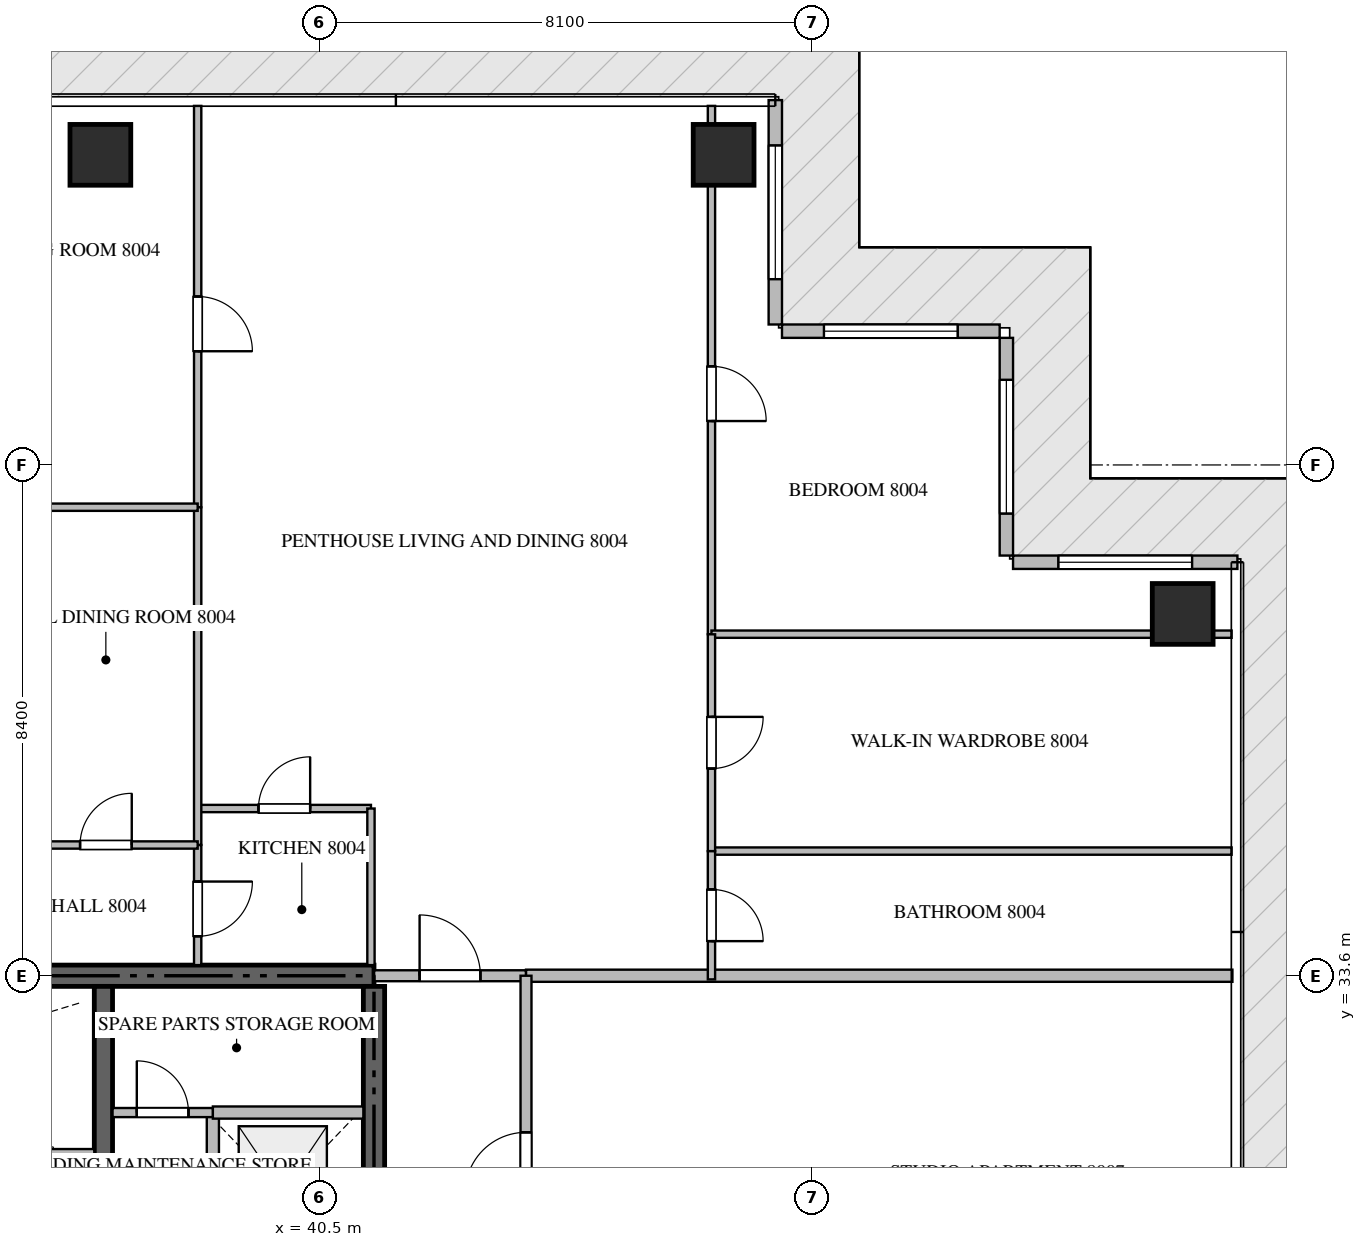
"""IFC4 building model, lengths in metres.
Left out: names, types, materials, properties, quantities, classifications, styles, units other than length and angle.
Written with IfcOpenShell. Run it as: python <this file> out.ifc"""

import sys

from ifc_helpers import new_model, si_unit, direction, frame, frame_2d, origin, origin_2d, place, context, subcontext, project, spatial, rectangle, extrude, source, transform, mapped, element, fill, save


model = new_model("IFC4")
c1 = context("Model", 3, precision=1e-05, world=origin(), true_north=direction((0.0, 1.0)))
c2 = subcontext(c1, "Body", "Model", "MODEL_VIEW")
j1 = project(units=[si_unit("LENGTHUNIT", "METRE"), si_unit("PLANEANGLEUNIT", "RADIAN")], contexts=[c1])
p1 = place(None, origin())
s1 = spatial("IfcSite", under=j1, at=p1, CompositionType="ELEMENT")
p2 = place(p1, origin())
s2 = spatial("IfcBuilding", under=s1, at=p2, CompositionType="ELEMENT")
p3 = place(p2, frame((0.0, 0.0, 321.8)))
s3 = spatial("IfcBuildingStorey", under=s2, at=p3, CompositionType="ELEMENT", Elevation=321.8)
p4 = place(p3, frame((41.4, 33.6, -0.26), z_axis=(0.0, 0.0, 1.0), x_axis=(-1.0, 0.0, 0.0)))
e1 = element("IfcWall", 1, at=p4, inside=s3, PredefinedType="SHEAR", context=c2, shape_type="SweptSolid", body=[
    extrude(rectangle(XDim=18.0, YDim=0.35, at=frame_2d((9.0, 0.0))), origin(), (0.0, 0.0, 1.0), 4.048),
])
p5 = place(p3, frame((41.4, 27.75, -0.26), z_axis=(0.0, 0.0, 1.0), x_axis=(0.0, 1.0, 0.0)))
e2 = element("IfcWall", 2, at=p5, inside=s3, PredefinedType="SHEAR", context=c2, shape_type="SweptSolid", body=[
    extrude(rectangle(XDim=5.675, YDim=0.35, at=frame_2d((2.837, 0.0))), origin(), (0.0, 0.0, 1.0), 4.048),
])
p6 = place(p3, frame((36.95, 27.05, -0.26), z_axis=(0.0, 0.0, 1.0), x_axis=(0.0, 1.0, 0.0)))
e3 = element("IfcWall", 3, at=p6, inside=s3, PredefinedType="SHEAR", context=c2, shape_type="SweptSolid", body=[
    extrude(rectangle(XDim=6.375, YDim=0.3, at=frame_2d((3.188, 0.0))), origin(), (0.0, 0.0, 1.0), 4.048),
])
m1 = source(origin(), c2, "Body", "SweptSolid", [
    extrude(rectangle(XDim=1.0, YDim=1.0, at=origin_2d()), origin(), (0.0, 0.0, 1.0), 4.05),
])
for number, where, z_axis, x_axis in (
    (4, (36.9, 47.1, -0.26), (0.0, 0.0, 1.0), (1.0, 0.0, 0.0)),
    (5, (47.15, 47.1, -0.26), (0.0, 0.0, 1.0), (1.0, 0.0, 0.0)),
    (6, (54.7, 39.55, -0.26), (0.0, 0.0, 1.0), (1.0, 0.0, 0.0)),
):
    element("IfcColumn", number, at=place(p3, frame(where, z_axis=z_axis, x_axis=x_axis)), inside=s3, PredefinedType="COLUMN", context=c2, shape_type="MappedRepresentation", body=[
        mapped(m1, transform((0.0, 0.0, 0.0), scale=1.0)),
    ])
p7 = place(p3, frame((55.6, 40.4, 0.0), z_axis=(0.0, 0.0, 1.0), x_axis=(-1.0, 0.0, 0.0)))
e7 = element("IfcWall", 7, at=p7, inside=s3, PredefinedType="ELEMENTEDWALL", context=c2, shape_type="SweptSolid", body=[
    extrude(rectangle(XDim=3.69, YDim=0.22, at=frame_2d((1.845, 0.0))), origin(), (0.0, 0.0, 1.0), 3.775),
])
p8 = place(p7, frame((0.745, 0.0, 0.65)))
e8 = element("IfcOpeningElement", 8, at=p8, cuts=e7, PredefinedType="OPENING", context=c2, shape_type="SweptSolid", body=[
    extrude(rectangle(XDim=2.2, YDim=2.4, at=frame_2d((1.1, 1.2))), frame((0.0, 0.12, 0.0), z_axis=(0.0, -1.0, 0.0), x_axis=(1.0, 0.0, 0.0)), (0.0, 0.0, 1.0), 0.24),
])
p9 = place(p3, frame((51.8, 40.51, 0.0), z_axis=(0.0, 0.0, 1.0), x_axis=(0.0, 1.0, 0.0)))
e9 = element("IfcWall", 9, at=p9, inside=s3, PredefinedType="ELEMENTEDWALL", context=c2, shape_type="SweptSolid", body=[
    extrude(rectangle(XDim=3.58, YDim=0.22, at=frame_2d((1.79, 0.0))), origin(), (0.0, 0.0, 1.0), 3.775),
])
p10 = place(p9, frame((0.69, 0.0, 0.65)))
e10 = element("IfcOpeningElement", 10, at=p10, cuts=e9, PredefinedType="OPENING", context=c2, shape_type="SweptSolid", body=[
    extrude(rectangle(XDim=2.2, YDim=2.4, at=frame_2d((1.1, 1.2))), frame((0.0, 0.12, 0.0), z_axis=(0.0, -1.0, 0.0), x_axis=(1.0, 0.0, 0.0)), (0.0, 0.0, 1.0), 0.24),
])
p11 = place(p3, frame((51.69, 44.2, 0.0), z_axis=(0.0, 0.0, 1.0), x_axis=(-1.0, 0.0, 0.0)))
e11 = element("IfcWall", 11, at=p11, inside=s3, PredefinedType="ELEMENTEDWALL", context=c2, shape_type="SweptSolid", body=[
    extrude(rectangle(XDim=3.58, YDim=0.22, at=frame_2d((1.79, 0.0))), origin(), (0.0, 0.0, 1.0), 3.775),
])
p12 = place(p11, frame((0.69, 0.0, 0.65)))
e12 = element("IfcOpeningElement", 12, at=p12, cuts=e11, PredefinedType="OPENING", context=c2, shape_type="SweptSolid", body=[
    extrude(rectangle(XDim=2.2, YDim=2.4, at=frame_2d((1.1, 1.2))), frame((0.0, 0.12, 0.0), z_axis=(0.0, -1.0, 0.0), x_axis=(1.0, 0.0, 0.0)), (0.0, 0.0, 1.0), 0.24),
])
p13 = place(p3, frame((48.0, 44.31, 0.0), z_axis=(0.0, 0.0, 1.0), x_axis=(0.0, 1.0, 0.0)))
e13 = element("IfcWall", 13, at=p13, inside=s3, PredefinedType="ELEMENTEDWALL", context=c2, shape_type="SweptSolid", body=[
    extrude(rectangle(XDim=3.69, YDim=0.22, at=frame_2d((1.845, 0.0))), origin(), (0.0, 0.0, 1.0), 3.775),
])
p14 = place(p13, frame((0.745, 0.0, 0.65)))
e14 = element("IfcOpeningElement", 14, at=p14, cuts=e13, PredefinedType="OPENING", context=c2, shape_type="SweptSolid", body=[
    extrude(rectangle(XDim=2.2, YDim=2.4, at=frame_2d((1.1, 1.2))), frame((0.0, 0.12, 0.0), z_axis=(0.0, -1.0, 0.0), x_axis=(1.0, 0.0, 0.0)), (0.0, 0.0, 1.0), 0.24),
])
p15 = place(p3, frame((35.0, 30.65, 0.0), z_axis=(0.0, 0.0, 1.0), x_axis=(1.0, 0.0, 0.0)))
e15 = element("IfcWall", 15, at=p15, inside=s3, PredefinedType="STANDARD", context=c2, shape_type="SweptSolid", body=[
    extrude(rectangle(XDim=1.8, YDim=0.2, at=frame_2d((0.9, 0.0))), origin(), (0.0, 0.0, 1.0), 3.79),
])
p16 = place(p3, frame((38.75, 28.85, 0.0), z_axis=(0.0, 0.0, 1.0), x_axis=(0.0, 1.0, 0.0)))
e16 = element("IfcWall", 16, at=p16, inside=s3, PredefinedType="STANDARD", context=c2, shape_type="SweptSolid", body=[
    extrude(rectangle(XDim=2.5, YDim=0.2, at=frame_2d((1.25, 0.0))), origin(), (0.0, 0.0, 1.0), 3.79),
])
p17 = place(p3, frame((38.75, 31.35, 0.0), z_axis=(0.0, 0.0, 1.0), x_axis=(1.0, 0.0, 0.0)))
e17 = element("IfcWall", 17, at=p17, inside=s3, PredefinedType="STANDARD", context=c2, shape_type="SweptSolid", body=[
    extrude(rectangle(XDim=2.475, YDim=0.2, at=frame_2d((1.238, 0.0))), origin(), (0.0, 0.0, 1.0), 3.79),
])
p18 = place(p3, frame((37.1, 31.35, 0.0), z_axis=(0.0, 0.0, 1.0), x_axis=(1.0, 0.0, 0.0)))
e18 = element("IfcWall", 18, at=p18, inside=s3, PredefinedType="PARTITIONING", context=c2, shape_type="SweptSolid", body=[
    extrude(rectangle(XDim=1.648, YDim=0.15, at=frame_2d((0.824, 0.0))), origin(), (0.0, 0.0, 1.0), 3.79),
])
p19 = place(p18, frame((0.399, 0.0, 0.0)))
e19 = element("IfcOpeningElement", 19, at=p19, cuts=e18, PredefinedType="OPENING", context=c2, shape_type="SweptSolid", body=[
    extrude(rectangle(XDim=0.85, YDim=2.1, at=frame_2d((0.425, 1.05))), frame((0.0, 0.085, 0.0), z_axis=(0.0, -1.0, 0.0), x_axis=(1.0, 0.0, 0.0)), (0.0, 0.0, 1.0), 0.17),
])
p20 = place(p3, frame((43.9, 33.6, 0.0), z_axis=(0.0, 0.0, 1.0), x_axis=(1.0, 0.0, 0.0)))
e20 = element("IfcWall", 20, at=p20, inside=s3, PredefinedType="PARTITIONING", context=c2, shape_type="SweptSolid", body=[
    extrude(rectangle(XDim=11.618, YDim=0.2, at=frame_2d((5.809, 0.0))), origin(), (0.0, 0.0, 1.0), 3.79),
])
p21 = place(p3, frame((41.402, 33.6, 0.0), z_axis=(0.0, 0.0, 1.0), x_axis=(1.0, 0.0, 0.0)))
e21 = element("IfcWall", 21, at=p21, inside=s3, PredefinedType="PARTITIONING", context=c2, shape_type="SweptSolid", body=[
    extrude(rectangle(XDim=2.496, YDim=0.18, at=frame_2d((1.248, 0.0))), origin(), (0.0, 0.0, 1.0), 3.79),
])
p22 = place(p21, frame((0.748, 0.0, 0.0)))
e22 = element("IfcOpeningElement", 22, at=p22, cuts=e21, PredefinedType="OPENING", context=c2, shape_type="SweptSolid", body=[
    extrude(rectangle(XDim=1.0, YDim=2.15, at=frame_2d((0.5, 1.075))), frame((0.0, 0.1, 0.0), z_axis=(0.0, -1.0, 0.0), x_axis=(1.0, 0.0, 0.0)), (0.0, 0.0, 1.0), 0.2),
])
p23 = place(p3, frame((43.9, 16.8, 0.0), z_axis=(0.0, 0.0, 1.0), x_axis=(0.0, 1.0, 0.0)))
e23 = element("IfcWall", 23, at=p23, inside=s3, PredefinedType="PARTITIONING", context=c2, shape_type="SweptSolid", body=[
    extrude(rectangle(XDim=16.8, YDim=0.18, at=frame_2d((8.4, 0.0))), origin(), (0.0, 0.0, 1.0), 3.79),
])
p24 = place(p23, frame((4.803, 0.0, 0.0)))
e24 = element("IfcOpeningElement", 24, at=p24, cuts=e23, PredefinedType="OPENING", context=c2, shape_type="SweptSolid", body=[
    extrude(rectangle(XDim=1.0, YDim=2.15, at=frame_2d((0.5, 1.075))), frame((0.0, 0.1, 0.0), z_axis=(0.0, -1.0, 0.0), x_axis=(1.0, 0.0, 0.0)), (0.0, 0.0, 1.0), 0.2),
])
p25 = place(p23, frame((13.225, 0.0, 0.0)))
e25 = element("IfcOpeningElement", 25, at=p25, cuts=e23, PredefinedType="OPENING", context=c2, shape_type="SweptSolid", body=[
    extrude(rectangle(XDim=1.0, YDim=2.15, at=frame_2d((0.5, 1.075))), frame((0.0, 0.1, 0.0), z_axis=(0.0, -1.0, 0.0), x_axis=(1.0, 0.0, 0.0)), (0.0, 0.0, 1.0), 0.2),
])
p26 = place(p3, frame((38.5, 36.35, 0.0), z_axis=(0.0, 0.0, 1.0), x_axis=(1.0, 0.0, 0.0)))
e26 = element("IfcWall", 26, at=p26, inside=s3, PredefinedType="PARTITIONING", context=c2, shape_type="SweptSolid", body=[
    extrude(rectangle(XDim=2.85, YDim=0.12, at=frame_2d((1.425, 0.0))), origin(), (0.0, 0.0, 1.0), 3.492),
])
p27 = place(p26, frame((1.0, 0.0, 0.0)))
e27 = element("IfcOpeningElement", 27, at=p27, cuts=e26, PredefinedType="OPENING", context=c2, shape_type="SweptSolid", body=[
    extrude(rectangle(XDim=0.85, YDim=2.1, at=frame_2d((0.425, 1.05))), frame((0.0, 0.07, 0.0), z_axis=(0.0, -1.0, 0.0), x_axis=(1.0, 0.0, 0.0)), (0.0, 0.0, 1.0), 0.14),
])
p28 = place(p3, frame((41.35, 36.35, 0.0), z_axis=(0.0, 0.0, 1.0), x_axis=(0.0, -1.0, 0.0)))
e28 = element("IfcWall", 28, at=p28, inside=s3, PredefinedType="PARTITIONING", context=c2, shape_type="SweptSolid", body=[
    extrude(rectangle(XDim=2.575, YDim=0.12, at=frame_2d((1.288, 0.0))), origin(), (0.0, 0.0, 1.0), 3.79),
])
p29 = place(p3, frame((38.5, 35.75, 0.0), z_axis=(0.0, 0.0, 1.0), x_axis=(0.0, -1.0, 0.0)))
e29 = element("IfcWall", 29, at=p29, inside=s3, PredefinedType="PARTITIONING", context=c2, shape_type="SweptSolid", body=[
    extrude(rectangle(XDim=1.975, YDim=0.12, at=frame_2d((0.988, 0.0))), origin(), (0.0, 0.0, 1.0), 3.79),
])
p30 = place(p29, frame((0.601, 0.0, 0.0)))
e30 = element("IfcOpeningElement", 30, at=p30, cuts=e29, PredefinedType="OPENING", context=c2, shape_type="SweptSolid", body=[
    extrude(rectangle(XDim=0.9, YDim=2.1, at=frame_2d((0.45, 1.05))), frame((0.0, 0.07, 0.0), z_axis=(0.0, -1.0, 0.0), x_axis=(1.0, 0.0, 0.0)), (0.0, 0.0, 1.0), 0.14),
])
p31 = place(p3, frame((38.5, 47.905, 0.0), z_axis=(0.0, 0.0, 1.0), x_axis=(0.0, -1.0, 0.0)))
e31 = element("IfcWall", 31, at=p31, inside=s3, PredefinedType="PARTITIONING", context=c2, shape_type="SweptSolid", body=[
    extrude(rectangle(XDim=6.6, YDim=0.12, at=frame_2d((3.3, 0.0))), origin(), (0.0, 0.0, 1.0), 3.79),
])
p32 = place(p31, frame((3.135, 0.0, 0.0)))
e32 = element("IfcOpeningElement", 32, at=p32, cuts=e31, PredefinedType="OPENING", context=c2, shape_type="SweptSolid", body=[
    extrude(rectangle(XDim=0.9, YDim=2.1, at=frame_2d((0.45, 1.05))), frame((0.0, 0.07, 0.0), z_axis=(0.0, -1.0, 0.0), x_axis=(1.0, 0.0, 0.0)), (0.0, 0.0, 1.0), 0.14),
])
p33 = place(p3, frame((38.5, 41.303, 0.0), z_axis=(0.0, 0.0, 1.0), x_axis=(0.0, -1.0, 0.0)))
e33 = element("IfcWall", 33, at=p33, inside=s3, PredefinedType="PARTITIONING", context=c2, shape_type="SweptSolid", body=[
    extrude(rectangle(XDim=5.551, YDim=0.12, at=frame_2d((2.775, 0.0))), origin(), (0.0, 0.0, 1.0), 3.79),
])
p34 = place(p3, frame((33.38, 41.305, 0.0), z_axis=(0.0, 0.0, 1.0), x_axis=(1.0, 0.0, 0.0)))
e34 = element("IfcWall", 34, at=p34, inside=s3, PredefinedType="PARTITIONING", context=c2, shape_type="SweptSolid", body=[
    extrude(rectangle(XDim=5.12, YDim=0.12, at=frame_2d((2.56, 0.0))), origin(), (0.0, 0.0, 1.0), 3.79),
])
p35 = place(p3, frame((35.482, 35.75, 0.0), z_axis=(0.0, 0.0, 1.0), x_axis=(1.0, 0.0, 0.0)))
e35 = element("IfcWall", 35, at=p35, inside=s3, PredefinedType="PARTITIONING", context=c2, shape_type="SweptSolid", body=[
    extrude(rectangle(XDim=3.018, YDim=0.12, at=frame_2d((1.509, 0.0))), origin(), (0.0, 0.0, 1.0), 3.79),
])
p36 = place(p35, frame((1.084, 0.0, 0.0)))
e36 = element("IfcOpeningElement", 36, at=p36, cuts=e35, PredefinedType="OPENING", context=c2, shape_type="SweptSolid", body=[
    extrude(rectangle(XDim=0.85, YDim=2.1, at=frame_2d((0.425, 1.05))), frame((0.0, 0.07, 0.0), z_axis=(0.0, -1.0, 0.0), x_axis=(1.0, 0.0, 0.0)), (0.0, 0.0, 1.0), 0.14),
])
p37 = place(p3, frame((46.95, 47.905, 0.0), z_axis=(0.0, 0.0, 1.0), x_axis=(0.0, -1.0, 0.0)))
e37 = element("IfcWall", 37, at=p37, inside=s3, PredefinedType="PARTITIONING", context=c2, shape_type="SweptSolid", body=[
    extrude(rectangle(XDim=8.688, YDim=0.12, at=frame_2d((4.344, 0.0))), origin(), (0.0, 0.0, 1.0), 3.292),
])
p38 = place(p37, frame((4.283, 0.0, 0.0)))
e38 = element("IfcOpeningElement", 38, at=p38, cuts=e37, PredefinedType="OPENING", context=c2, shape_type="SweptSolid", body=[
    extrude(rectangle(XDim=0.9, YDim=2.1, at=frame_2d((0.45, 1.05))), frame((0.0, 0.07, 0.0), z_axis=(0.0, -1.0, 0.0), x_axis=(1.0, 0.0, 0.0)), (0.0, 0.0, 1.0), 0.14),
])
for number, where, z_axis, x_axis in (
    (39, (46.95, 39.217, 0.0), (0.0, 0.0, 1.0), (1.0, 0.0, 0.0)),
    (40, (46.95, 35.65, 0.0), (0.0, 0.0, 1.0), (1.0, 0.0, 0.0)),
):
    element("IfcWall", number, at=place(p3, frame(where, z_axis=z_axis, x_axis=x_axis)), inside=s3, PredefinedType="PARTITIONING", context=c2, shape_type="SweptSolid", body=[
        extrude(rectangle(XDim=8.555, YDim=0.12, at=frame_2d((4.277, 0.0))), origin(), (0.0, 0.0, 1.0), 3.79),
    ])
p39 = place(p3, frame((46.95, 39.215, 0.0), z_axis=(0.0, 0.0, 1.0), x_axis=(0.0, -1.0, 0.0)))
e41 = element("IfcWall", 41, at=p39, inside=s3, PredefinedType="PARTITIONING", context=c2, shape_type="SweptSolid", body=[
    extrude(rectangle(XDim=3.565, YDim=0.12, at=frame_2d((1.783, 0.0))), origin(), (0.0, 0.0, 1.0), 3.372),
])
p40 = place(p39, frame((1.358, 0.0, 0.0)))
e42 = element("IfcOpeningElement", 42, at=p40, cuts=e41, PredefinedType="OPENING", context=c2, shape_type="SweptSolid", body=[
    extrude(rectangle(XDim=0.85, YDim=2.1, at=frame_2d((0.425, 1.05))), frame((0.0, 0.07, 0.0), z_axis=(0.0, -1.0, 0.0), x_axis=(1.0, 0.0, 0.0)), (0.0, 0.0, 1.0), 0.14),
])
p41 = place(p3, frame((46.95, 35.648, 0.0), z_axis=(0.0, 0.0, 1.0), x_axis=(0.0, -1.0, 0.0)))
e43 = element("IfcWall", 43, at=p41, inside=s3, PredefinedType="PARTITIONING", context=c2, shape_type="SweptSolid", body=[
    extrude(rectangle(XDim=2.108, YDim=0.12, at=frame_2d((1.054, 0.0))), origin(), (0.0, 0.0, 1.0), 3.372),
])
p42 = place(p41, frame((0.629, 0.0, 0.0)))
e44 = element("IfcOpeningElement", 44, at=p42, cuts=e43, PredefinedType="OPENING", context=c2, shape_type="SweptSolid", body=[
    extrude(rectangle(XDim=0.85, YDim=2.1, at=frame_2d((0.425, 1.05))), frame((0.0, 0.07, 0.0), z_axis=(0.0, -1.0, 0.0), x_axis=(1.0, 0.0, 0.0)), (0.0, 0.0, 1.0), 0.14),
])
m2 = source(origin(), c2, "Body", "SweptSolid", [
    extrude(rectangle(XDim=2.2, YDim=2.4, at=frame_2d((1.1, 1.2))), frame((0.0, 0.03, 0.0), z_axis=(0.0, -1.0, 0.0), x_axis=(1.0, 0.0, 0.0)), (0.0, 0.0, 1.0), 0.06),
])
p43 = place(p8, origin())
e45 = element("IfcWindow", 45, at=p43, inside=s3, PartitioningType="SINGLE_PANEL", PredefinedType="WINDOW", context=c2, shape_type="MappedRepresentation", body=[
    mapped(m2, transform((0.0, 0.0, 0.0), scale=1.0)),
])
fill(e8, e45)
p44 = place(p10, origin())
e46 = element("IfcWindow", 46, at=p44, inside=s3, PartitioningType="SINGLE_PANEL", PredefinedType="WINDOW", context=c2, shape_type="MappedRepresentation", body=[
    mapped(m2, transform((0.0, 0.0, 0.0), scale=1.0)),
])
fill(e10, e46)
p45 = place(p12, origin())
e47 = element("IfcWindow", 47, at=p45, inside=s3, PartitioningType="SINGLE_PANEL", PredefinedType="WINDOW", context=c2, shape_type="MappedRepresentation", body=[
    mapped(m2, transform((0.0, 0.0, 0.0), scale=1.0)),
])
fill(e12, e47)
p46 = place(p14, origin())
e48 = element("IfcWindow", 48, at=p46, inside=s3, PartitioningType="SINGLE_PANEL", PredefinedType="WINDOW", context=c2, shape_type="MappedRepresentation", body=[
    mapped(m2, transform((0.0, 0.0, 0.0), scale=1.0)),
])
fill(e14, e48)
m3 = source(origin(), c2, "Body", "SweptSolid", [
    extrude(rectangle(XDim=0.85, YDim=2.1, at=frame_2d((0.425, 1.05))), frame((0.0, 0.025, 0.0), z_axis=(0.0, -1.0, 0.0), x_axis=(1.0, 0.0, 0.0)), (0.0, 0.0, 1.0), 0.05),
])
p47 = place(p19, origin())
e49 = element("IfcDoor", 49, at=p47, inside=s3, OperationType="SINGLE_SWING_LEFT", PredefinedType="DOOR", context=c2, shape_type="MappedRepresentation", body=[
    mapped(m3, transform((0.0, 0.0, 0.0), scale=1.0)),
])
fill(e19, e49)
m4 = source(origin(), c2, "Body", "SweptSolid", [
    extrude(rectangle(XDim=1.0, YDim=2.15, at=frame_2d((0.5, 1.075))), frame((0.0, 0.025, 0.0), z_axis=(0.0, -1.0, 0.0), x_axis=(1.0, 0.0, 0.0)), (0.0, 0.0, 1.0), 0.05),
])
p48 = place(p22, origin())
e50 = element("IfcDoor", 50, at=p48, inside=s3, OperationType="SINGLE_SWING_LEFT", PredefinedType="DOOR", context=c2, shape_type="MappedRepresentation", body=[
    mapped(m4, transform((0.0, 0.0, 0.0), scale=1.0)),
])
fill(e22, e50)
p49 = place(p25, origin())
e51 = element("IfcDoor", 51, at=p49, inside=s3, OperationType="SINGLE_SWING_LEFT", PredefinedType="DOOR", context=c2, shape_type="MappedRepresentation", body=[
    mapped(m4, transform((0.0, 0.0, 0.0), scale=1.0)),
])
fill(e25, e51)
p50 = place(p27, origin())
e52 = element("IfcDoor", 52, at=p50, inside=s3, OperationType="SINGLE_SWING_RIGHT", PredefinedType="DOOR", context=c2, shape_type="MappedRepresentation", body=[
    mapped(m3, transform((0.0, 0.0, 0.0), scale=1.0)),
])
fill(e27, e52)
m5 = source(origin(), c2, "Body", "SweptSolid", [
    extrude(rectangle(XDim=0.9, YDim=2.1, at=frame_2d((0.45, 1.05))), frame((0.0, 0.025, 0.0), z_axis=(0.0, -1.0, 0.0), x_axis=(1.0, 0.0, 0.0)), (0.0, 0.0, 1.0), 0.05),
])
p51 = place(p30, origin())
e53 = element("IfcDoor", 53, at=p51, inside=s3, OperationType="SINGLE_SWING_LEFT", PredefinedType="DOOR", context=c2, shape_type="MappedRepresentation", body=[
    mapped(m5, transform((0.0, 0.0, 0.0), scale=1.0)),
])
fill(e30, e53)
p52 = place(p32, origin())
e54 = element("IfcDoor", 54, at=p52, inside=s3, OperationType="SINGLE_SWING_RIGHT", PredefinedType="DOOR", context=c2, shape_type="MappedRepresentation", body=[
    mapped(m5, transform((0.0, 0.0, 0.0), scale=1.0)),
])
fill(e32, e54)
p53 = place(p36, origin())
e55 = element("IfcDoor", 55, at=p53, inside=s3, OperationType="SINGLE_SWING_RIGHT", PredefinedType="DOOR", context=c2, shape_type="MappedRepresentation", body=[
    mapped(m3, transform((0.0, 0.0, 0.0), scale=1.0)),
])
fill(e36, e55)
p54 = place(p38, origin())
e56 = element("IfcDoor", 56, at=p54, inside=s3, OperationType="SINGLE_SWING_RIGHT", PredefinedType="DOOR", context=c2, shape_type="MappedRepresentation", body=[
    mapped(m5, transform((0.0, 0.0, 0.0), scale=1.0)),
])
fill(e38, e56)
p55 = place(p40, origin())
e57 = element("IfcDoor", 57, at=p55, inside=s3, OperationType="SINGLE_SWING_LEFT", PredefinedType="DOOR", context=c2, shape_type="MappedRepresentation", body=[
    mapped(m3, transform((0.0, 0.0, 0.0), scale=1.0)),
])
fill(e42, e57)
p56 = place(p42, origin())
e58 = element("IfcDoor", 58, at=p56, inside=s3, OperationType="SINGLE_SWING_RIGHT", PredefinedType="DOOR", context=c2, shape_type="MappedRepresentation", body=[
    mapped(m3, transform((0.0, 0.0, 0.0), scale=1.0)),
])
fill(e44, e58)
save(model, sys.argv[1])
